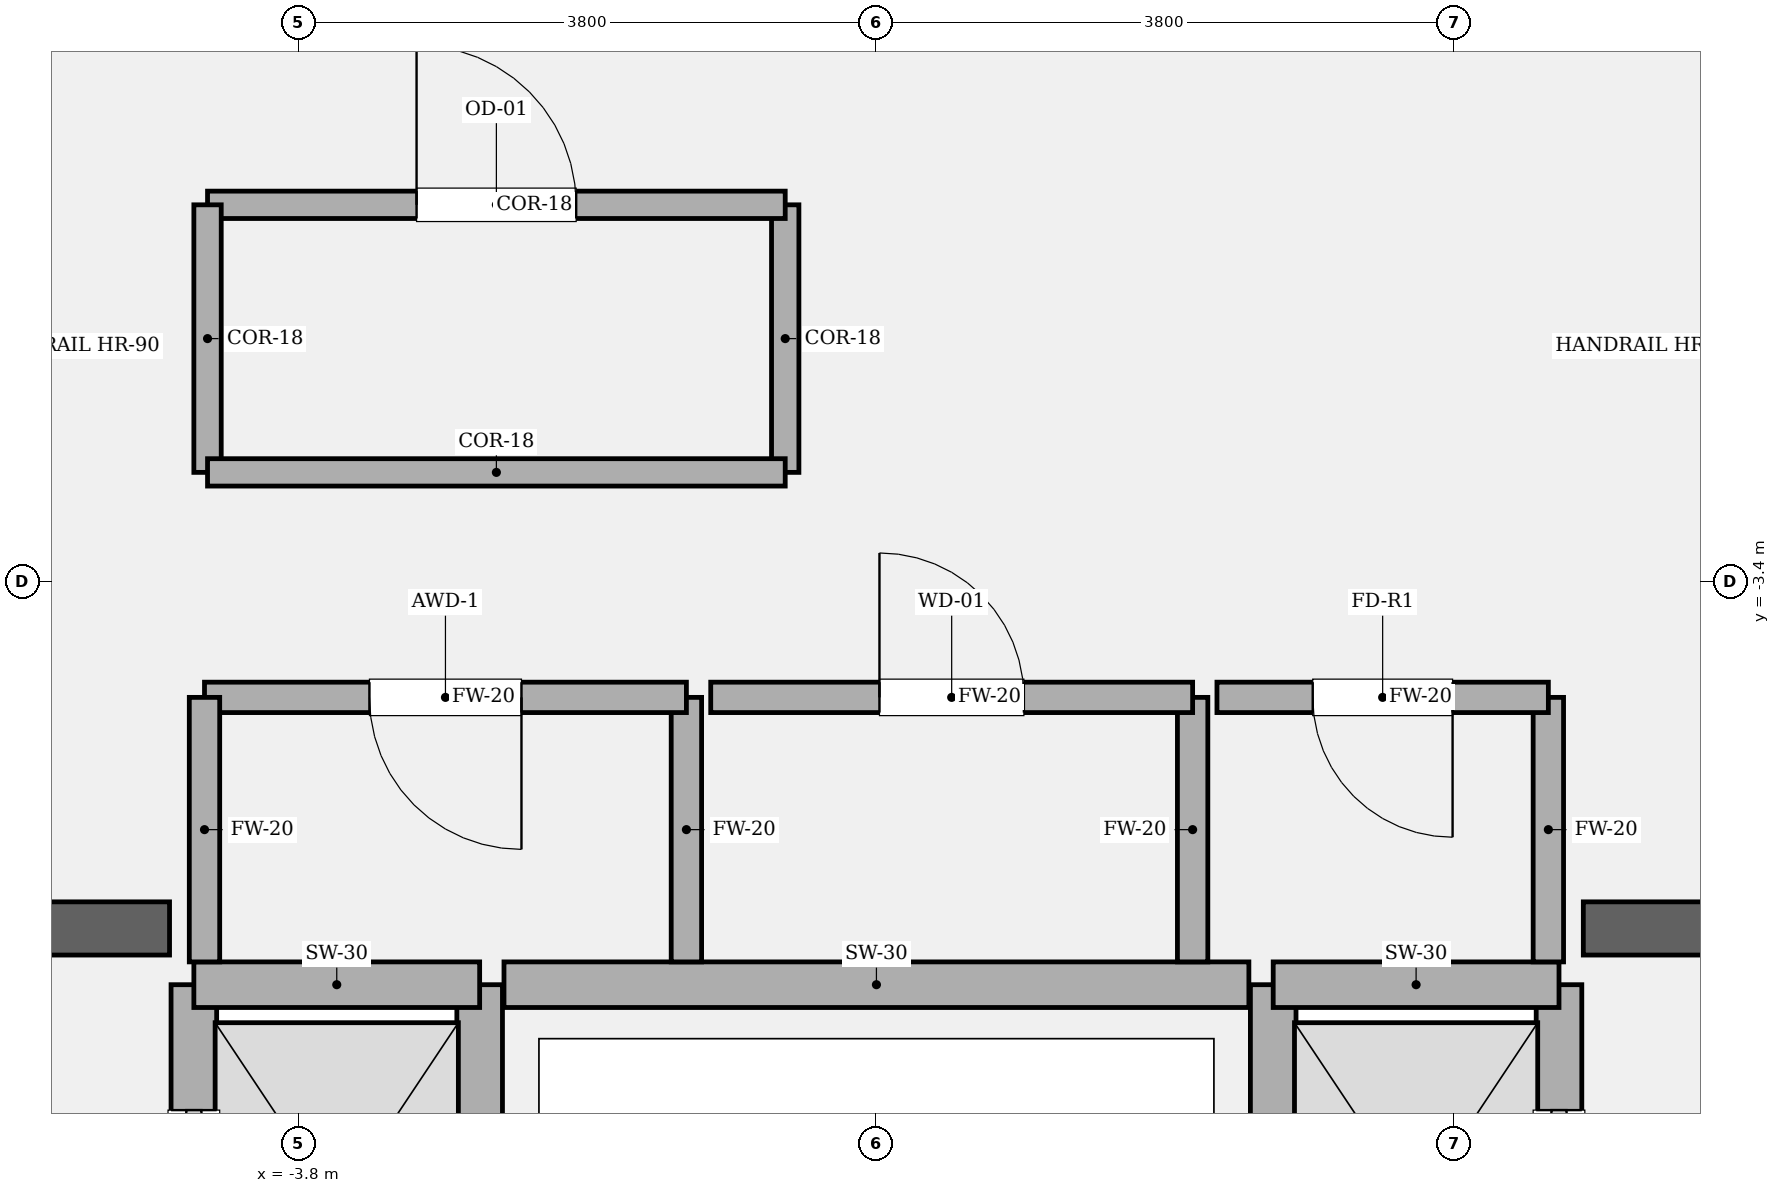
"""IFC4 building model, lengths in metres.
Left out: names, types, materials, properties, quantities, classifications, styles, units other than length and angle.
Written with IfcOpenShell. Run it as: python <this file> out.ifc"""

import sys

from ifc_helpers import new_model, si_unit, direction, frame, frame_2d, origin, place, context, subcontext, project, spatial, rectangle, extrude, element, fill, save


model = new_model("IFC4")
c1 = context("Model", 3, precision=1e-05, world=origin(), true_north=direction((0.0, 1.0)))
c2 = subcontext(c1, "Body", "Model", "MODEL_VIEW")
j1 = project(units=[si_unit("LENGTHUNIT", "METRE"), si_unit("PLANEANGLEUNIT", "RADIAN")], contexts=[c1])
p1 = place(None, origin())
s1 = spatial("IfcSite", under=j1, at=p1, CompositionType="ELEMENT")
p2 = place(p1, origin())
s2 = spatial("IfcBuilding", under=s1, at=p2, CompositionType="ELEMENT")
p3 = place(p2, frame((0.0, 0.0, 216.75)))
s3 = spatial("IfcBuildingStorey", under=s2, at=p3, CompositionType="ELEMENT", Elevation=216.75)
p4 = place(p3, frame((-9.875, -5.68, 0.0), z_axis=(0.0, 0.0, 1.0), x_axis=(1.0, 0.0, 0.0)))
e1 = element("IfcWall", 1, at=p4, inside=s3, PredefinedType="SOLIDWALL", context=c2, shape_type="SweptSolid", body=[
    extrude(rectangle(XDim=5.225, YDim=0.35, at=frame_2d((2.613, 0.0))), origin(), (0.0, 0.0, 1.0), 4.05),
])
p5 = place(p4, frame((1.335, 0.0, 0.0)))
e2 = element("IfcOpeningElement", 2, at=p5, cuts=e1, PredefinedType="OPENING", context=c2, shape_type="SweptSolid", body=[
    extrude(rectangle(XDim=1.18, YDim=2.2, at=frame_2d((0.59, 1.1))), frame((0.0, 0.185, 0.0), z_axis=(0.0, -1.0, 0.0), x_axis=(1.0, 0.0, 0.0)), (0.0, 0.0, 1.0), 0.37),
])
p6 = place(p3, frame((4.65, -5.68, 0.0), z_axis=(0.0, 0.0, 1.0), x_axis=(1.0, 0.0, 0.0)))
e3 = element("IfcWall", 3, at=p6, inside=s3, PredefinedType="SOLIDWALL", context=c2, shape_type="SweptSolid", body=[
    extrude(rectangle(XDim=5.225, YDim=0.35, at=frame_2d((2.613, 0.0))), origin(), (0.0, 0.0, 1.0), 4.05),
])
p7 = place(p6, frame((2.71, 0.0, 0.0)))
e4 = element("IfcOpeningElement", 4, at=p7, cuts=e3, PredefinedType="OPENING", context=c2, shape_type="SweptSolid", body=[
    extrude(rectangle(XDim=1.18, YDim=2.2, at=frame_2d((0.59, 1.1))), frame((0.0, 0.185, 0.0), z_axis=(0.0, -1.0, 0.0), x_axis=(1.0, 0.0, 0.0)), (0.0, 0.0, 1.0), 0.37),
])
p8 = place(p3, frame((-4.49, -8.82, 0.0), z_axis=(0.0, 0.0, 1.0), x_axis=(0.0, 1.0, 0.0)))
e5 = element("IfcWall", 5, at=p8, inside=s3, PredefinedType="SOLIDWALL", context=c2, shape_type="SweptSolid", body=[
    extrude(rectangle(XDim=2.77, YDim=0.3, at=frame_2d((1.385, 0.0))), origin(), (0.0, 0.0, 1.0), 3.83),
])
p9 = place(p8, frame((0.825, 0.0, 0.0)))
e6 = element("IfcOpeningElement", 6, at=p9, cuts=e5, PredefinedType="OPENING", context=c2, shape_type="SweptSolid", body=[
    extrude(rectangle(XDim=1.12, YDim=2.25, at=frame_2d((0.56, 1.125))), frame((0.0, 0.16, 0.0), z_axis=(0.0, -1.0, 0.0), x_axis=(1.0, 0.0, 0.0)), (0.0, 0.0, 1.0), 0.32),
])
p10 = place(p3, frame((-2.61, -8.82, 0.0), z_axis=(0.0, 0.0, 1.0), x_axis=(0.0, 1.0, 0.0)))
e7 = element("IfcWall", 7, at=p10, inside=s3, PredefinedType="SOLIDWALL", context=c2, shape_type="SweptSolid", body=[
    extrude(rectangle(XDim=2.77, YDim=0.3, at=frame_2d((1.385, 0.0))), origin(), (0.0, 0.0, 1.0), 3.83),
])
p11 = place(p3, frame((-4.49, -6.05, 0.0), z_axis=(0.0, 0.0, 1.0), x_axis=(1.0, 0.0, 0.0)))
e8 = element("IfcWall", 8, at=p11, inside=s3, PredefinedType="SOLIDWALL", context=c2, shape_type="SweptSolid", body=[
    extrude(rectangle(XDim=1.88, YDim=0.3, at=frame_2d((0.94, 0.0))), origin(), (0.0, 0.0, 1.0), 3.83),
])
p12 = place(p3, frame((4.49, -8.82, 0.0), z_axis=(0.0, 0.0, 1.0), x_axis=(0.0, 1.0, 0.0)))
e9 = element("IfcWall", 9, at=p12, inside=s3, PredefinedType="SOLIDWALL", context=c2, shape_type="SweptSolid", body=[
    extrude(rectangle(XDim=2.77, YDim=0.3, at=frame_2d((1.385, 0.0))), origin(), (0.0, 0.0, 1.0), 3.83),
])
p13 = place(p12, frame((0.825, 0.0, 0.0)))
e10 = element("IfcOpeningElement", 10, at=p13, cuts=e9, PredefinedType="OPENING", context=c2, shape_type="SweptSolid", body=[
    extrude(rectangle(XDim=1.12, YDim=2.25, at=frame_2d((0.56, 1.125))), frame((0.0, 0.16, 0.0), z_axis=(0.0, -1.0, 0.0), x_axis=(1.0, 0.0, 0.0)), (0.0, 0.0, 1.0), 0.32),
])
p14 = place(p3, frame((2.61, -8.82, 0.0), z_axis=(0.0, 0.0, 1.0), x_axis=(0.0, 1.0, 0.0)))
e11 = element("IfcWall", 11, at=p14, inside=s3, PredefinedType="SOLIDWALL", context=c2, shape_type="SweptSolid", body=[
    extrude(rectangle(XDim=2.77, YDim=0.3, at=frame_2d((1.385, 0.0))), origin(), (0.0, 0.0, 1.0), 3.83),
])
p15 = place(p3, frame((2.61, -6.05, 0.0), z_axis=(0.0, 0.0, 1.0), x_axis=(1.0, 0.0, 0.0)))
e12 = element("IfcWall", 12, at=p15, inside=s3, PredefinedType="SOLIDWALL", context=c2, shape_type="SweptSolid", body=[
    extrude(rectangle(XDim=1.88, YDim=0.3, at=frame_2d((0.94, 0.0))), origin(), (0.0, 0.0, 1.0), 3.83),
])
p16 = place(p3, frame((-2.45, -6.05, 0.0), z_axis=(0.0, 0.0, 1.0), x_axis=(1.0, 0.0, 0.0)))
e13 = element("IfcWall", 13, at=p16, inside=s3, PredefinedType="SOLIDWALL", context=c2, shape_type="SweptSolid", body=[
    extrude(rectangle(XDim=4.9, YDim=0.3, at=frame_2d((2.45, 0.0))), origin(), (0.0, 0.0, 1.0), 3.83),
])
p17 = place(p3, frame((-1.25, -5.9, 0.0), z_axis=(0.0, 0.0, 1.0), x_axis=(0.0, 1.0, 0.0)))
e14 = element("IfcWall", 14, at=p17, inside=s3, PredefinedType="SOLIDWALL", context=c2, shape_type="SweptSolid", body=[
    extrude(rectangle(XDim=1.74, YDim=0.2, at=frame_2d((0.87, 0.0))), origin(), (0.0, 0.0, 1.0), 3.83),
])
p18 = place(p3, frame((-1.25, -4.16, 0.0), z_axis=(0.0, 0.0, 1.0), x_axis=(-1.0, 0.0, 0.0)))
e15 = element("IfcWall", 15, at=p18, inside=s3, PredefinedType="SOLIDWALL", context=c2, shape_type="SweptSolid", body=[
    extrude(rectangle(XDim=3.17, YDim=0.2, at=frame_2d((1.585, 0.0))), origin(), (0.0, 0.0, 1.0), 3.83),
])
p19 = place(p18, frame((1.085, 0.0, 0.0)))
e16 = element("IfcOpeningElement", 16, at=p19, cuts=e15, PredefinedType="OPENING", context=c2, shape_type="SweptSolid", body=[
    extrude(rectangle(XDim=1.0, YDim=2.15, at=frame_2d((0.5, 1.075))), frame((0.0, 0.11, 0.0), z_axis=(0.0, -1.0, 0.0), x_axis=(1.0, 0.0, 0.0)), (0.0, 0.0, 1.0), 0.22),
])
for number, where, z_axis, x_axis in (
    (17, (-4.42, -4.16, 0.0), (0.0, 0.0, 1.0), (0.0, -1.0, 0.0)),
    (18, (2.08, -5.9, 0.0), (0.0, 0.0, 1.0), (0.0, 1.0, 0.0)),
):
    element("IfcWall", number, at=place(p3, frame(where, z_axis=z_axis, x_axis=x_axis)), inside=s3, PredefinedType="SOLIDWALL", context=c2, shape_type="SweptSolid", body=[
        extrude(rectangle(XDim=1.74, YDim=0.2, at=frame_2d((0.87, 0.0))), origin(), (0.0, 0.0, 1.0), 3.83),
    ])
p20 = place(p3, frame((2.08, -4.16, 0.0), z_axis=(0.0, 0.0, 1.0), x_axis=(-1.0, 0.0, 0.0)))
e19 = element("IfcWall", 19, at=p20, inside=s3, PredefinedType="SOLIDWALL", context=c2, shape_type="SweptSolid", body=[
    extrude(rectangle(XDim=3.17, YDim=0.2, at=frame_2d((1.585, 0.0))), origin(), (0.0, 0.0, 1.0), 3.83),
])
p21 = place(p20, frame((1.11, 0.0, 0.0)))
e20 = element("IfcOpeningElement", 20, at=p21, cuts=e19, PredefinedType="OPENING", context=c2, shape_type="SweptSolid", body=[
    extrude(rectangle(XDim=0.95, YDim=2.15, at=frame_2d((0.475, 1.075))), frame((0.0, 0.11, 0.0), z_axis=(0.0, -1.0, 0.0), x_axis=(1.0, 0.0, 0.0)), (0.0, 0.0, 1.0), 0.22),
])
p22 = place(p3, frame((4.42, -5.9, 0.0), z_axis=(0.0, 0.0, 1.0), x_axis=(0.0, 1.0, 0.0)))
e21 = element("IfcWall", 21, at=p22, inside=s3, PredefinedType="SOLIDWALL", context=c2, shape_type="SweptSolid", body=[
    extrude(rectangle(XDim=1.74, YDim=0.2, at=frame_2d((0.87, 0.0))), origin(), (0.0, 0.0, 1.0), 3.83),
])
p23 = place(p3, frame((4.42, -4.16, 0.0), z_axis=(0.0, 0.0, 1.0), x_axis=(-1.0, 0.0, 0.0)))
e22 = element("IfcWall", 22, at=p23, inside=s3, PredefinedType="SOLIDWALL", context=c2, shape_type="SweptSolid", body=[
    extrude(rectangle(XDim=2.18, YDim=0.2, at=frame_2d((1.09, 0.0))), origin(), (0.0, 0.0, 1.0), 3.83),
])
p24 = place(p23, frame((0.63, 0.0, 0.0)))
e23 = element("IfcOpeningElement", 23, at=p24, cuts=e22, PredefinedType="OPENING", context=c2, shape_type="SweptSolid", body=[
    extrude(rectangle(XDim=0.92, YDim=2.1, at=frame_2d((0.46, 1.05))), frame((0.0, 0.11, 0.0), z_axis=(0.0, -1.0, 0.0), x_axis=(1.0, 0.0, 0.0)), (0.0, 0.0, 1.0), 0.22),
])
p25 = place(p3, frame((-0.6, -2.68, 0.0), z_axis=(0.0, 0.0, 1.0), x_axis=(0.0, 1.0, 0.0)))
e24 = element("IfcWall", 24, at=p25, inside=s3, PredefinedType="PARTITIONING", context=c2, shape_type="SweptSolid", body=[
    extrude(rectangle(XDim=1.76, YDim=0.18, at=frame_2d((0.88, 0.0))), origin(), (0.0, 0.0, 1.0), 3.83),
])
p26 = place(p3, frame((-0.6, -0.92, 0.0), z_axis=(0.0, 0.0, 1.0), x_axis=(-1.0, 0.0, 0.0)))
e25 = element("IfcWall", 25, at=p26, inside=s3, PredefinedType="PARTITIONING", context=c2, shape_type="SweptSolid", body=[
    extrude(rectangle(XDim=3.8, YDim=0.18, at=frame_2d((1.9, 0.0))), origin(), (0.0, 0.0, 1.0), 3.83),
])
p27 = place(p26, frame((1.375, 0.0, 0.0)))
e26 = element("IfcOpeningElement", 26, at=p27, cuts=e25, PredefinedType="OPENING", context=c2, shape_type="SweptSolid", body=[
    extrude(rectangle(XDim=1.05, YDim=2.2, at=frame_2d((0.525, 1.1))), frame((0.0, 0.1, 0.0), z_axis=(0.0, -1.0, 0.0), x_axis=(1.0, 0.0, 0.0)), (0.0, 0.0, 1.0), 0.2),
])
p28 = place(p3, frame((-4.4, -0.92, 0.0), z_axis=(0.0, 0.0, 1.0), x_axis=(0.0, -1.0, 0.0)))
e27 = element("IfcWall", 27, at=p28, inside=s3, PredefinedType="PARTITIONING", context=c2, shape_type="SweptSolid", body=[
    extrude(rectangle(XDim=1.76, YDim=0.18, at=frame_2d((0.88, 0.0))), origin(), (0.0, 0.0, 1.0), 3.83),
])
p29 = place(p3, frame((-4.4, -2.68, 0.0), z_axis=(0.0, 0.0, 1.0), x_axis=(1.0, 0.0, 0.0)))
e28 = element("IfcWall", 28, at=p29, inside=s3, PredefinedType="PARTITIONING", context=c2, shape_type="SweptSolid", body=[
    extrude(rectangle(XDim=3.8, YDim=0.18, at=frame_2d((1.9, 0.0))), origin(), (0.0, 0.0, 1.0), 3.83),
])
p30 = place(p9, origin())
e29 = element("IfcDoor", 29, at=p30, inside=s3, OperationType="SLIDING_TO_LEFT", PredefinedType="DOOR", context=c2, shape_type="SweptSolid", body=[
    extrude(rectangle(XDim=1.12, YDim=2.25, at=frame_2d((0.56, 1.125))), frame((0.0, 0.025, 0.0), z_axis=(0.0, -1.0, 0.0), x_axis=(1.0, 0.0, 0.0)), (0.0, 0.0, 1.0), 0.05),
])
fill(e6, e29)
p31 = place(p13, origin())
e30 = element("IfcDoor", 30, at=p31, inside=s3, OperationType="SLIDING_TO_RIGHT", PredefinedType="DOOR", context=c2, shape_type="SweptSolid", body=[
    extrude(rectangle(XDim=1.12, YDim=2.25, at=frame_2d((0.56, 1.125))), frame((0.0, 0.025, 0.0), z_axis=(0.0, -1.0, 0.0), x_axis=(1.0, 0.0, 0.0)), (0.0, 0.0, 1.0), 0.05),
])
fill(e10, e30)
p32 = place(p19, origin())
e31 = element("IfcDoor", 31, at=p32, inside=s3, OperationType="SINGLE_SWING_LEFT", PredefinedType="DOOR", context=c2, shape_type="SweptSolid", body=[
    extrude(rectangle(XDim=1.0, YDim=2.15, at=frame_2d((0.5, 1.075))), frame((0.0, 0.025, 0.0), z_axis=(0.0, -1.0, 0.0), x_axis=(1.0, 0.0, 0.0)), (0.0, 0.0, 1.0), 0.05),
])
fill(e16, e31)
p33 = place(p21, origin())
e32 = element("IfcDoor", 32, at=p33, inside=s3, OperationType="SINGLE_SWING_RIGHT", PredefinedType="DOOR", context=c2, shape_type="SweptSolid", body=[
    extrude(rectangle(XDim=0.95, YDim=2.15, at=frame_2d((0.475, 1.075))), frame((0.0, 0.025, 0.0), z_axis=(0.0, -1.0, 0.0), x_axis=(1.0, 0.0, 0.0)), (0.0, 0.0, 1.0), 0.05),
])
fill(e20, e32)
p34 = place(p24, origin())
e33 = element("IfcDoor", 33, at=p34, inside=s3, OperationType="SINGLE_SWING_LEFT", PredefinedType="DOOR", context=c2, shape_type="SweptSolid", body=[
    extrude(rectangle(XDim=0.92, YDim=2.1, at=frame_2d((0.46, 1.05))), frame((0.0, 0.025, 0.0), z_axis=(0.0, -1.0, 0.0), x_axis=(1.0, 0.0, 0.0)), (0.0, 0.0, 1.0), 0.05),
])
fill(e23, e33)
p35 = place(p27, origin())
e34 = element("IfcDoor", 34, at=p35, inside=s3, OperationType="SINGLE_SWING_RIGHT", PredefinedType="DOOR", context=c2, shape_type="SweptSolid", body=[
    extrude(rectangle(XDim=1.05, YDim=2.2, at=frame_2d((0.525, 1.1))), frame((0.0, 0.025, 0.0), z_axis=(0.0, -1.0, 0.0), x_axis=(1.0, 0.0, 0.0)), (0.0, 0.0, 1.0), 0.05),
])
fill(e26, e34)
save(model, sys.argv[1])
